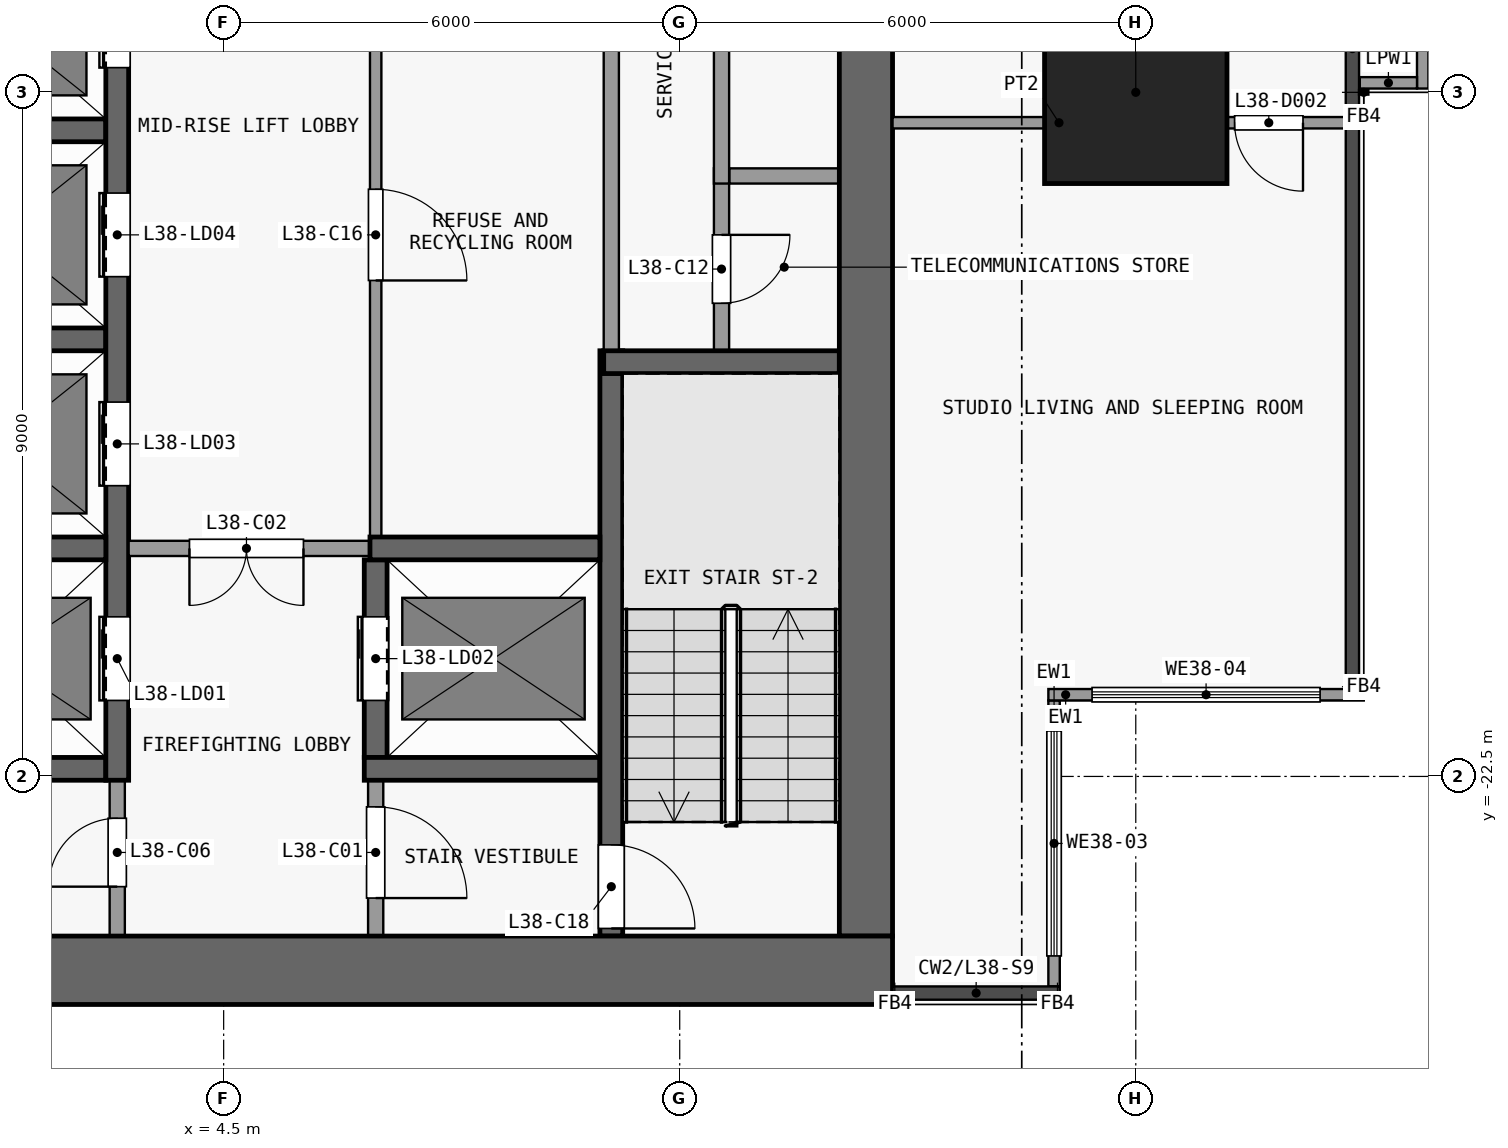
"""IFC4 building model, lengths in metres.
Left out: names, types, materials, properties, quantities, classifications, styles, units other than length and angle.
Written with IfcOpenShell. Run it as: python <this file> out.ifc"""

import sys

from ifc_helpers import new_model, si_unit, direction, frame, frame_2d, origin, origin_2d, place, context, subcontext, project, spatial, rectangle, extrude, element, fill, save


model = new_model("IFC4")
c1 = context("Model", 3, precision=1e-05, world=origin(), true_north=direction((0.0, 1.0)))
c2 = subcontext(c1, "Body", "Model", "MODEL_VIEW")
j1 = project(units=[si_unit("LENGTHUNIT", "METRE"), si_unit("PLANEANGLEUNIT", "RADIAN")], contexts=[c1])
p1 = place(None, origin())
s1 = spatial("IfcSite", under=j1, at=p1, CompositionType="ELEMENT")
p2 = place(p1, origin())
s2 = spatial("IfcBuilding", under=s1, at=p2, CompositionType="ELEMENT")
p3 = place(p2, frame((0.0, 0.0, 156.5)))
s3 = spatial("IfcBuildingStorey", under=s2, at=p3, CompositionType="ELEMENT", Elevation=156.5)
p4 = place(p3, frame((16.5, -13.5, 0.0), z_axis=(0.0, 0.0, 1.0), x_axis=(1.0, 0.0, 0.0)))
e1 = element("IfcColumn", 1, at=p4, inside=s3, PredefinedType="COLUMN", context=c2, shape_type="SweptSolid", body=[
    extrude(rectangle(XDim=2.4, YDim=2.4, at=origin_2d()), origin(), (0.0, 0.0, 1.0), 3.6),
])
p5 = place(p3, frame((-13.3, -25.05, 0.0), z_axis=(0.0, 0.0, 1.0), x_axis=(1.0, 0.0, 0.0)))
e2 = element("IfcWall", 2, at=p5, inside=s3, PredefinedType="SHEAR", context=c2, shape_type="SweptSolid", body=[
    extrude(rectangle(XDim=26.6, YDim=0.9, at=frame_2d((13.3, 0.0))), origin(), (0.0, 0.0, 1.0), 3.3),
])
p6 = place(p3, frame((12.95, -24.6, 0.0), z_axis=(0.0, 0.0, 1.0), x_axis=(0.0, 1.0, 0.0)))
e3 = element("IfcWall", 3, at=p6, inside=s3, PredefinedType="SHEAR", context=c2, shape_type="SweptSolid", body=[
    extrude(rectangle(XDim=16.1, YDim=0.7, at=frame_2d((8.05, 0.0))), origin(), (0.0, 0.0, 1.0), 3.3),
])
p7 = place(p3, frame((-3.25, -22.4, 0.0), z_axis=(0.0, 0.0, 1.0), x_axis=(1.0, 0.0, 0.0)))
e4 = element("IfcWall", 4, at=p7, inside=s3, PredefinedType="SHEAR", context=c2, shape_type="SweptSolid", body=[
    extrude(rectangle(XDim=6.2, YDim=0.3, at=frame_2d((3.1, 0.0))), origin(), (0.0, 0.0, 1.0), 3.3),
])
p8 = place(p3, frame((6.35, -22.4, 0.0), z_axis=(0.0, 0.0, 1.0), x_axis=(1.0, 0.0, 0.0)))
e5 = element("IfcWall", 5, at=p8, inside=s3, PredefinedType="SHEAR", context=c2, shape_type="SweptSolid", body=[
    extrude(rectangle(XDim=3.1, YDim=0.3, at=frame_2d((1.55, 0.0))), origin(), (0.0, 0.0, 1.0), 3.3),
])
p9 = place(p3, frame((0.15, -19.5, 0.0), z_axis=(0.0, 0.0, 1.0), x_axis=(1.0, 0.0, 0.0)))
e6 = element("IfcWall", 6, at=p9, inside=s3, PredefinedType="SHEAR", context=c2, shape_type="SweptSolid", body=[
    extrude(rectangle(XDim=2.8, YDim=0.3, at=frame_2d((1.4, 0.0))), origin(), (0.0, 0.0, 1.0), 3.3),
])
p10 = place(p3, frame((6.575, -19.5, 0.0), z_axis=(0.0, 0.0, 1.0), x_axis=(-1.0, 0.0, 0.0)))
e7 = element("IfcWall", 7, at=p10, inside=s3, PredefinedType="PARTITIONING", context=c2, shape_type="SweptSolid", body=[
    extrude(rectangle(XDim=3.325, YDim=0.2, at=frame_2d((1.663, 0.0))), origin(), (0.0, 0.0, 1.0), 3.3),
])
p11 = place(p10, frame((1.025, 0.0, 0.0)))
e8 = element("IfcOpeningElement", 8, at=p11, cuts=e7, PredefinedType="OPENING", context=c2, shape_type="SweptSolid", body=[
    extrude(rectangle(XDim=1.5, YDim=2.1, at=frame_2d((0.75, 1.05))), frame((0.0, 0.11, 0.0), z_axis=(0.0, -1.0, 0.0), x_axis=(1.0, 0.0, 0.0)), (0.0, 0.0, 1.0), 0.22),
])
p12 = place(p3, frame((6.425, -19.5, 0.0), z_axis=(0.0, 0.0, 1.0), x_axis=(1.0, 0.0, 0.0)))
e9 = element("IfcWall", 9, at=p12, inside=s3, PredefinedType="SHEAR", context=c2, shape_type="SweptSolid", body=[
    extrude(rectangle(XDim=3.025, YDim=0.3, at=frame_2d((1.512, 0.0))), origin(), (0.0, 0.0, 1.0), 3.3),
])
p13 = place(p3, frame((9.5, -17.05, 0.0), z_axis=(0.0, 0.0, 1.0), x_axis=(1.0, 0.0, 0.0)))
e10 = element("IfcWall", 10, at=p13, inside=s3, PredefinedType="SHEAR", context=c2, shape_type="SweptSolid", body=[
    extrude(rectangle(XDim=3.1, YDim=0.3, at=frame_2d((1.55, 0.0))), origin(), (0.0, 0.0, 1.0), 3.3),
])
p14 = place(p3, frame((0.15, -16.75, 0.0), z_axis=(0.0, 0.0, 1.0), x_axis=(1.0, 0.0, 0.0)))
e11 = element("IfcWall", 11, at=p14, inside=s3, PredefinedType="SHEAR", context=c2, shape_type="SweptSolid", body=[
    extrude(rectangle(XDim=2.8, YDim=0.3, at=frame_2d((1.4, 0.0))), origin(), (0.0, 0.0, 1.0), 3.3),
])
p15 = place(p3, frame((11.15, -14.6, 0.0), z_axis=(0.0, 0.0, 1.0), x_axis=(1.0, 0.0, 0.0)))
e12 = element("IfcWall", 12, at=p15, inside=s3, PredefinedType="PARTITIONING", context=c2, shape_type="SweptSolid", body=[
    extrude(rectangle(XDim=1.45, YDim=0.2, at=frame_2d((0.725, 0.0))), origin(), (0.0, 0.0, 1.0), 3.3),
])
p16 = place(p3, frame((0.15, -14.0, 0.0), z_axis=(0.0, 0.0, 1.0), x_axis=(1.0, 0.0, 0.0)))
e13 = element("IfcWall", 13, at=p16, inside=s3, PredefinedType="SHEAR", context=c2, shape_type="SweptSolid", body=[
    extrude(rectangle(XDim=2.8, YDim=0.3, at=frame_2d((1.4, 0.0))), origin(), (0.0, 0.0, 1.0), 3.3),
])
p17 = place(p3, frame((3.1, -24.6, 0.0), z_axis=(0.0, 0.0, 1.0), x_axis=(0.0, 1.0, 0.0)))
e14 = element("IfcWall", 14, at=p17, inside=s3, PredefinedType="PARTITIONING", context=c2, shape_type="SweptSolid", body=[
    extrude(rectangle(XDim=2.05, YDim=0.2, at=frame_2d((1.025, 0.0))), origin(), (0.0, 0.0, 1.0), 3.3),
])
p18 = place(p17, frame((0.65, 0.0, 0.0)))
e15 = element("IfcOpeningElement", 15, at=p18, cuts=e14, PredefinedType="OPENING", context=c2, shape_type="SweptSolid", body=[
    extrude(rectangle(XDim=0.9, YDim=2.1, at=frame_2d((0.45, 1.05))), frame((0.0, 0.11, 0.0), z_axis=(0.0, -1.0, 0.0), x_axis=(1.0, 0.0, 0.0)), (0.0, 0.0, 1.0), 0.22),
])
p19 = place(p3, frame((3.1, -22.55, 0.0), z_axis=(0.0, 0.0, 1.0), x_axis=(0.0, 1.0, 0.0)))
e16 = element("IfcWall", 16, at=p19, inside=s3, PredefinedType="SHEAR", context=c2, shape_type="SweptSolid", body=[
    extrude(rectangle(XDim=14.05, YDim=0.3, at=frame_2d((7.025, 0.0))), origin(), (0.0, 0.0, 1.0), 3.3),
])
p20 = place(p19, frame((1.05, 0.0, 0.0)))
e17 = element("IfcOpeningElement", 17, at=p20, cuts=e16, PredefinedType="OPENING", context=c2, shape_type="SweptSolid", body=[
    extrude(rectangle(XDim=1.1, YDim=2.1, at=frame_2d((0.55, 1.05))), frame((0.0, 0.16, 0.0), z_axis=(0.0, -1.0, 0.0), x_axis=(1.0, 0.0, 0.0)), (0.0, 0.0, 1.0), 0.32),
])
p21 = place(p19, frame((3.875, 0.0, 0.0)))
e18 = element("IfcOpeningElement", 18, at=p21, cuts=e16, PredefinedType="OPENING", context=c2, shape_type="SweptSolid", body=[
    extrude(rectangle(XDim=1.1, YDim=2.1, at=frame_2d((0.55, 1.05))), frame((0.0, 0.16, 0.0), z_axis=(0.0, -1.0, 0.0), x_axis=(1.0, 0.0, 0.0)), (0.0, 0.0, 1.0), 0.32),
])
p22 = place(p19, frame((6.625, 0.0, 0.0)))
e19 = element("IfcOpeningElement", 19, at=p22, cuts=e16, PredefinedType="OPENING", context=c2, shape_type="SweptSolid", body=[
    extrude(rectangle(XDim=1.1, YDim=2.1, at=frame_2d((0.55, 1.05))), frame((0.0, 0.16, 0.0), z_axis=(0.0, -1.0, 0.0), x_axis=(1.0, 0.0, 0.0)), (0.0, 0.0, 1.0), 0.32),
])
p23 = place(p19, frame((9.375, 0.0, 0.0)))
e20 = element("IfcOpeningElement", 20, at=p23, cuts=e16, PredefinedType="OPENING", context=c2, shape_type="SweptSolid", body=[
    extrude(rectangle(XDim=1.1, YDim=2.1, at=frame_2d((0.55, 1.05))), frame((0.0, 0.16, 0.0), z_axis=(0.0, -1.0, 0.0), x_axis=(1.0, 0.0, 0.0)), (0.0, 0.0, 1.0), 0.32),
])
p24 = place(p19, frame((12.125, 0.0, 0.0)))
e21 = element("IfcOpeningElement", 21, at=p24, cuts=e16, PredefinedType="OPENING", context=c2, shape_type="SweptSolid", body=[
    extrude(rectangle(XDim=1.1, YDim=2.1, at=frame_2d((0.55, 1.05))), frame((0.0, 0.16, 0.0), z_axis=(0.0, -1.0, 0.0), x_axis=(1.0, 0.0, 0.0)), (0.0, 0.0, 1.0), 0.32),
])
p25 = place(p3, frame((6.5, -22.55, 0.0), z_axis=(0.0, 0.0, 1.0), x_axis=(0.0, -1.0, 0.0)))
e22 = element("IfcWall", 22, at=p25, inside=s3, PredefinedType="PARTITIONING", context=c2, shape_type="SweptSolid", body=[
    extrude(rectangle(XDim=2.05, YDim=0.2, at=frame_2d((1.025, 0.0))), origin(), (0.0, 0.0, 1.0), 3.3),
])
p26 = place(p25, frame((0.35, 0.0, 0.0)))
e23 = element("IfcOpeningElement", 23, at=p26, cuts=e22, PredefinedType="OPENING", context=c2, shape_type="SweptSolid", body=[
    extrude(rectangle(XDim=1.2, YDim=2.1, at=frame_2d((0.6, 1.05))), frame((0.0, 0.11, 0.0), z_axis=(0.0, -1.0, 0.0), x_axis=(1.0, 0.0, 0.0)), (0.0, 0.0, 1.0), 0.22),
])
p27 = place(p3, frame((6.5, -22.25, 0.0), z_axis=(0.0, 0.0, 1.0), x_axis=(0.0, 1.0, 0.0)))
e24 = element("IfcWall", 24, at=p27, inside=s3, PredefinedType="SHEAR", context=c2, shape_type="SweptSolid", body=[
    extrude(rectangle(XDim=2.6, YDim=0.3, at=frame_2d((1.3, 0.0))), origin(), (0.0, 0.0, 1.0), 3.3),
])
p28 = place(p27, frame((0.75, 0.0, 0.0)))
e25 = element("IfcOpeningElement", 25, at=p28, cuts=e24, PredefinedType="OPENING", context=c2, shape_type="SweptSolid", body=[
    extrude(rectangle(XDim=1.1, YDim=2.1, at=frame_2d((0.55, 1.05))), frame((0.0, 0.16, 0.0), z_axis=(0.0, -1.0, 0.0), x_axis=(1.0, 0.0, 0.0)), (0.0, 0.0, 1.0), 0.32),
])
p29 = place(p3, frame((6.5, -11.35, 0.0), z_axis=(0.0, 0.0, 1.0), x_axis=(0.0, -1.0, 0.0)))
e26 = element("IfcWall", 26, at=p29, inside=s3, PredefinedType="PARTITIONING", context=c2, shape_type="SweptSolid", body=[
    extrude(rectangle(XDim=8.0, YDim=0.15, at=frame_2d((4.0, 0.0))), origin(), (0.0, 0.0, 1.0), 3.3),
])
p30 = place(p29, frame((3.425, 0.0, 0.0)))
e27 = element("IfcOpeningElement", 27, at=p30, cuts=e26, PredefinedType="OPENING", context=c2, shape_type="SweptSolid", body=[
    extrude(rectangle(XDim=1.2, YDim=2.1, at=frame_2d((0.6, 1.05))), frame((0.0, 0.085, 0.0), z_axis=(0.0, -1.0, 0.0), x_axis=(1.0, 0.0, 0.0)), (0.0, 0.0, 1.0), 0.17),
])
p31 = place(p3, frame((9.6, -16.9, 0.0), z_axis=(0.0, 0.0, 1.0), x_axis=(0.0, -1.0, 0.0)))
e28 = element("IfcWall", 28, at=p31, inside=s3, PredefinedType="SHEAR", context=c2, shape_type="SweptSolid", body=[
    extrude(rectangle(XDim=7.7, YDim=0.3, at=frame_2d((3.85, 0.0))), origin(), (0.0, 0.0, 1.0), 3.3),
])
p32 = place(p31, frame((6.5, 0.0, 0.0)))
e29 = element("IfcOpeningElement", 29, at=p32, cuts=e28, PredefinedType="OPENING", context=c2, shape_type="SweptSolid", body=[
    extrude(rectangle(XDim=1.1, YDim=2.1, at=frame_2d((0.55, 1.05))), frame((0.0, 0.16, 0.0), z_axis=(0.0, -1.0, 0.0), x_axis=(1.0, 0.0, 0.0)), (0.0, 0.0, 1.0), 0.32),
])
p33 = place(p3, frame((9.6, -16.9, 0.0), z_axis=(0.0, 0.0, 1.0), x_axis=(0.0, 1.0, 0.0)))
e30 = element("IfcWall", 30, at=p33, inside=s3, PredefinedType="PARTITIONING", context=c2, shape_type="SweptSolid", body=[
    extrude(rectangle(XDim=5.75, YDim=0.2, at=frame_2d((2.875, 0.0))), origin(), (0.0, 0.0, 1.0), 3.3),
])
p34 = place(p3, frame((11.05, -14.5, 0.0), z_axis=(0.0, 0.0, 1.0), x_axis=(0.0, -1.0, 0.0)))
e31 = element("IfcWall", 31, at=p34, inside=s3, PredefinedType="PARTITIONING", context=c2, shape_type="SweptSolid", body=[
    extrude(rectangle(XDim=2.4, YDim=0.2, at=frame_2d((1.2, 0.0))), origin(), (0.0, 0.0, 1.0), 3.3),
])
p35 = place(p34, frame((0.875, 0.0, 0.0)))
e32 = element("IfcOpeningElement", 32, at=p35, cuts=e31, PredefinedType="OPENING", context=c2, shape_type="SweptSolid", body=[
    extrude(rectangle(XDim=0.9, YDim=2.1, at=frame_2d((0.45, 1.05))), frame((0.0, 0.11, 0.0), z_axis=(0.0, -1.0, 0.0), x_axis=(1.0, 0.0, 0.0)), (0.0, 0.0, 1.0), 0.22),
])
p36 = place(p3, frame((11.05, -8.5, 0.0), z_axis=(0.0, 0.0, 1.0), x_axis=(0.0, -1.0, 0.0)))
e33 = element("IfcWall", 33, at=p36, inside=s3, PredefinedType="PARTITIONING", context=c2, shape_type="SweptSolid", body=[
    extrude(rectangle(XDim=6.2, YDim=0.2, at=frame_2d((3.1, 0.0))), origin(), (0.0, 0.0, 1.0), 3.3),
])
p37 = place(p36, frame((2.6, 0.0, 0.0)))
e34 = element("IfcOpeningElement", 34, at=p37, cuts=e33, PredefinedType="OPENING", context=c2, shape_type="SweptSolid", body=[
    extrude(rectangle(XDim=0.9, YDim=2.1, at=frame_2d((0.45, 1.05))), frame((0.0, 0.11, 0.0), z_axis=(0.0, -1.0, 0.0), x_axis=(1.0, 0.0, 0.0)), (0.0, 0.0, 1.0), 0.22),
])
p38 = place(p3, frame((15.425, -21.5, 0.0), z_axis=(0.0, 0.0, 1.0), x_axis=(0.0, -1.0, 0.0)))
e35 = element("IfcWall", 35, at=p38, inside=s3, PredefinedType="SOLIDWALL", context=c2, shape_type="SweptSolid", body=[
    extrude(rectangle(XDim=3.762, YDim=0.15, at=frame_2d((1.881, 0.0))), origin(), (0.0, 0.0, 1.0), 3.3),
])
p39 = place(p38, frame((0.401, 0.0, 0.9)))
e36 = element("IfcOpeningElement", 36, at=p39, cuts=e35, PredefinedType="OPENING", context=c2, shape_type="SweptSolid", body=[
    extrude(rectangle(XDim=2.96, YDim=2.4, at=frame_2d((1.48, 1.2))), frame((0.0, 0.085, 0.0), z_axis=(0.0, -1.0, 0.0), x_axis=(1.0, 0.0, 0.0)), (0.0, 0.0, 1.0), 0.17),
])
p40 = place(p3, frame((19.5, -21.425, 0.0), z_axis=(0.0, 0.0, 1.0), x_axis=(-1.0, 0.0, 0.0)))
e37 = element("IfcWall", 37, at=p40, inside=s3, PredefinedType="SOLIDWALL", context=c2, shape_type="SweptSolid", body=[
    extrude(rectangle(XDim=4.15, YDim=0.15, at=frame_2d((2.075, 0.0))), origin(), (0.0, 0.0, 1.0), 3.3),
])
p41 = place(p40, frame((0.575, 0.0, 0.9)))
e38 = element("IfcOpeningElement", 38, at=p41, cuts=e37, PredefinedType="OPENING", context=c2, shape_type="SweptSolid", body=[
    extrude(rectangle(XDim=3.0, YDim=2.4, at=frame_2d((1.5, 1.2))), frame((0.0, 0.085, 0.0), z_axis=(0.0, -1.0, 0.0), x_axis=(1.0, 0.0, 0.0)), (0.0, 0.0, 1.0), 0.17),
])
p42 = place(p3, frame((20.275, -4.448, 0.0), z_axis=(0.0, 0.0, 1.0), x_axis=(0.0, -1.0, 0.0)))
e39 = element("IfcWall", 39, at=p42, inside=s3, PredefinedType="PARAPET", context=c2, shape_type="SweptSolid", body=[
    extrude(rectangle(XDim=9.002, YDim=0.15, at=frame_2d((4.501, 0.0))), origin(), (0.0, 0.0, 1.0), 1.15),
])
p43 = place(p3, frame((20.2, -13.375, 0.0), z_axis=(0.0, 0.0, 1.0), x_axis=(-1.0, 0.0, 0.0)))
e40 = element("IfcWall", 40, at=p43, inside=s3, PredefinedType="PARAPET", context=c2, shape_type="SweptSolid", body=[
    extrude(rectangle(XDim=0.752, YDim=0.15, at=frame_2d((0.376, 0.0))), origin(), (0.0, 0.0, 1.0), 1.15),
])
p44 = place(p3, frame((13.3, -13.9, 0.0), z_axis=(0.0, 0.0, 1.0), x_axis=(1.0, 0.0, 0.0)))
e41 = element("IfcWall", 41, at=p44, inside=s3, PredefinedType="PARTITIONING", context=c2, shape_type="SweptSolid", body=[
    extrude(rectangle(XDim=5.962, YDim=0.15, at=frame_2d((2.981, 0.0))), origin(), (0.0, 0.0, 1.0), 3.3),
])
p45 = place(p44, frame((4.5, 0.0, 0.0)))
e42 = element("IfcOpeningElement", 42, at=p45, cuts=e41, PredefinedType="OPENING", context=c2, shape_type="SweptSolid", body=[
    extrude(rectangle(XDim=0.9, YDim=2.1, at=frame_2d((0.45, 1.05))), frame((0.0, 0.085, 0.0), z_axis=(0.0, -1.0, 0.0), x_axis=(1.0, 0.0, 0.0)), (0.0, 0.0, 1.0), 0.17),
])
p46 = place(p3, frame((16.3, -13.825, 0.0), z_axis=(0.0, 0.0, 1.0), x_axis=(0.0, 1.0, 0.0)))
e43 = element("IfcWall", 43, at=p46, inside=s3, PredefinedType="PARTITIONING", context=c2, shape_type="SweptSolid", body=[
    extrude(rectangle(XDim=2.85, YDim=0.15, at=frame_2d((1.425, 0.0))), origin(), (0.0, 0.0, 1.0), 3.3),
])
p47 = place(p20, origin())
e44 = element("IfcDoor", 44, at=p47, inside=s3, OperationType="DOUBLE_DOOR_SLIDING", PredefinedType="DOOR", context=c2, shape_type="SweptSolid", body=[
    extrude(rectangle(XDim=1.1, YDim=2.1, at=frame_2d((0.55, 1.05))), frame((0.0, 0.025, 0.0), z_axis=(0.0, -1.0, 0.0), x_axis=(1.0, 0.0, 0.0)), (0.0, 0.0, 1.0), 0.05),
])
fill(e17, e44)
p48 = place(p28, origin())
e45 = element("IfcDoor", 45, at=p48, inside=s3, OperationType="DOUBLE_DOOR_SLIDING", PredefinedType="DOOR", context=c2, shape_type="SweptSolid", body=[
    extrude(rectangle(XDim=1.1, YDim=2.1, at=frame_2d((0.55, 1.05))), frame((0.0, 0.025, 0.0), z_axis=(0.0, -1.0, 0.0), x_axis=(1.0, 0.0, 0.0)), (0.0, 0.0, 1.0), 0.05),
])
fill(e25, e45)
p49 = place(p21, origin())
e46 = element("IfcDoor", 46, at=p49, inside=s3, OperationType="DOUBLE_DOOR_SLIDING", PredefinedType="DOOR", context=c2, shape_type="SweptSolid", body=[
    extrude(rectangle(XDim=1.1, YDim=2.1, at=frame_2d((0.55, 1.05))), frame((0.0, 0.025, 0.0), z_axis=(0.0, -1.0, 0.0), x_axis=(1.0, 0.0, 0.0)), (0.0, 0.0, 1.0), 0.05),
])
fill(e18, e46)
p50 = place(p22, origin())
e47 = element("IfcDoor", 47, at=p50, inside=s3, OperationType="DOUBLE_DOOR_SLIDING", PredefinedType="DOOR", context=c2, shape_type="SweptSolid", body=[
    extrude(rectangle(XDim=1.1, YDim=2.1, at=frame_2d((0.55, 1.05))), frame((0.0, 0.025, 0.0), z_axis=(0.0, -1.0, 0.0), x_axis=(1.0, 0.0, 0.0)), (0.0, 0.0, 1.0), 0.05),
])
fill(e19, e47)
p51 = place(p23, origin())
e48 = element("IfcDoor", 48, at=p51, inside=s3, OperationType="DOUBLE_DOOR_SLIDING", PredefinedType="DOOR", context=c2, shape_type="SweptSolid", body=[
    extrude(rectangle(XDim=1.1, YDim=2.1, at=frame_2d((0.55, 1.05))), frame((0.0, 0.025, 0.0), z_axis=(0.0, -1.0, 0.0), x_axis=(1.0, 0.0, 0.0)), (0.0, 0.0, 1.0), 0.05),
])
fill(e20, e48)
p52 = place(p26, origin())
e49 = element("IfcDoor", 49, at=p52, inside=s3, OperationType="SINGLE_SWING_RIGHT", PredefinedType="DOOR", context=c2, shape_type="SweptSolid", body=[
    extrude(rectangle(XDim=1.2, YDim=2.1, at=frame_2d((0.6, 1.05))), frame((0.0, 0.025, 0.0), z_axis=(0.0, -1.0, 0.0), x_axis=(1.0, 0.0, 0.0)), (0.0, 0.0, 1.0), 0.05),
])
fill(e23, e49)
p53 = place(p11, origin())
e50 = element("IfcDoor", 50, at=p53, inside=s3, OperationType="DOUBLE_DOOR_SINGLE_SWING", PredefinedType="DOOR", context=c2, shape_type="SweptSolid", body=[
    extrude(rectangle(XDim=1.5, YDim=2.1, at=frame_2d((0.75, 1.05))), frame((0.0, 0.025, 0.0), z_axis=(0.0, -1.0, 0.0), x_axis=(1.0, 0.0, 0.0)), (0.0, 0.0, 1.0), 0.05),
])
fill(e8, e50)
p54 = place(p18, origin())
e51 = element("IfcDoor", 51, at=p54, inside=s3, OperationType="SINGLE_SWING_LEFT", PredefinedType="DOOR", context=c2, shape_type="SweptSolid", body=[
    extrude(rectangle(XDim=0.9, YDim=2.1, at=frame_2d((0.45, 1.05))), frame((0.0, 0.025, 0.0), z_axis=(0.0, -1.0, 0.0), x_axis=(1.0, 0.0, 0.0)), (0.0, 0.0, 1.0), 0.05),
])
fill(e15, e51)
p55 = place(p35, origin())
e52 = element("IfcDoor", 52, at=p55, inside=s3, OperationType="SINGLE_SWING_LEFT", PredefinedType="DOOR", context=c2, shape_type="SweptSolid", body=[
    extrude(rectangle(XDim=0.9, YDim=2.1, at=frame_2d((0.45, 1.05))), frame((0.0, 0.025, 0.0), z_axis=(0.0, -1.0, 0.0), x_axis=(1.0, 0.0, 0.0)), (0.0, 0.0, 1.0), 0.05),
])
fill(e32, e52)
p56 = place(p30, origin())
e53 = element("IfcDoor", 53, at=p56, inside=s3, OperationType="SINGLE_SWING_RIGHT", PredefinedType="DOOR", context=c2, shape_type="SweptSolid", body=[
    extrude(rectangle(XDim=1.2, YDim=2.1, at=frame_2d((0.6, 1.05))), frame((0.0, 0.025, 0.0), z_axis=(0.0, -1.0, 0.0), x_axis=(1.0, 0.0, 0.0)), (0.0, 0.0, 1.0), 0.05),
])
fill(e27, e53)
p57 = place(p32, origin())
e54 = element("IfcDoor", 54, at=p57, inside=s3, OperationType="SINGLE_SWING_RIGHT", PredefinedType="DOOR", context=c2, shape_type="SweptSolid", body=[
    extrude(rectangle(XDim=1.1, YDim=2.1, at=frame_2d((0.55, 1.05))), frame((0.0, 0.025, 0.0), z_axis=(0.0, -1.0, 0.0), x_axis=(1.0, 0.0, 0.0)), (0.0, 0.0, 1.0), 0.05),
])
fill(e29, e54)
p58 = place(p39, origin())
e55 = element("IfcWindow", 55, at=p58, inside=s3, PartitioningType="SINGLE_PANEL", PredefinedType="WINDOW", context=c2, shape_type="SweptSolid", body=[
    extrude(rectangle(XDim=2.96, YDim=2.4, at=frame_2d((1.48, 1.2))), frame((0.0, 0.03, 0.0), z_axis=(0.0, -1.0, 0.0), x_axis=(1.0, 0.0, 0.0)), (0.0, 0.0, 1.0), 0.06),
])
fill(e36, e55)
p59 = place(p41, origin())
e56 = element("IfcWindow", 56, at=p59, inside=s3, PartitioningType="SINGLE_PANEL", PredefinedType="WINDOW", context=c2, shape_type="SweptSolid", body=[
    extrude(rectangle(XDim=3.0, YDim=2.4, at=frame_2d((1.5, 1.2))), frame((0.0, 0.03, 0.0), z_axis=(0.0, -1.0, 0.0), x_axis=(1.0, 0.0, 0.0)), (0.0, 0.0, 1.0), 0.06),
])
fill(e38, e56)
p60 = place(p45, origin())
e57 = element("IfcDoor", 57, at=p60, inside=s3, OperationType="SINGLE_SWING_RIGHT", PredefinedType="DOOR", context=c2, shape_type="SweptSolid", body=[
    extrude(rectangle(XDim=0.9, YDim=2.1, at=frame_2d((0.45, 1.05))), frame((0.0, 0.025, 0.0), z_axis=(0.0, -1.0, 0.0), x_axis=(1.0, 0.0, 0.0)), (0.0, 0.0, 1.0), 0.05),
])
fill(e42, e57)
save(model, sys.argv[1])
